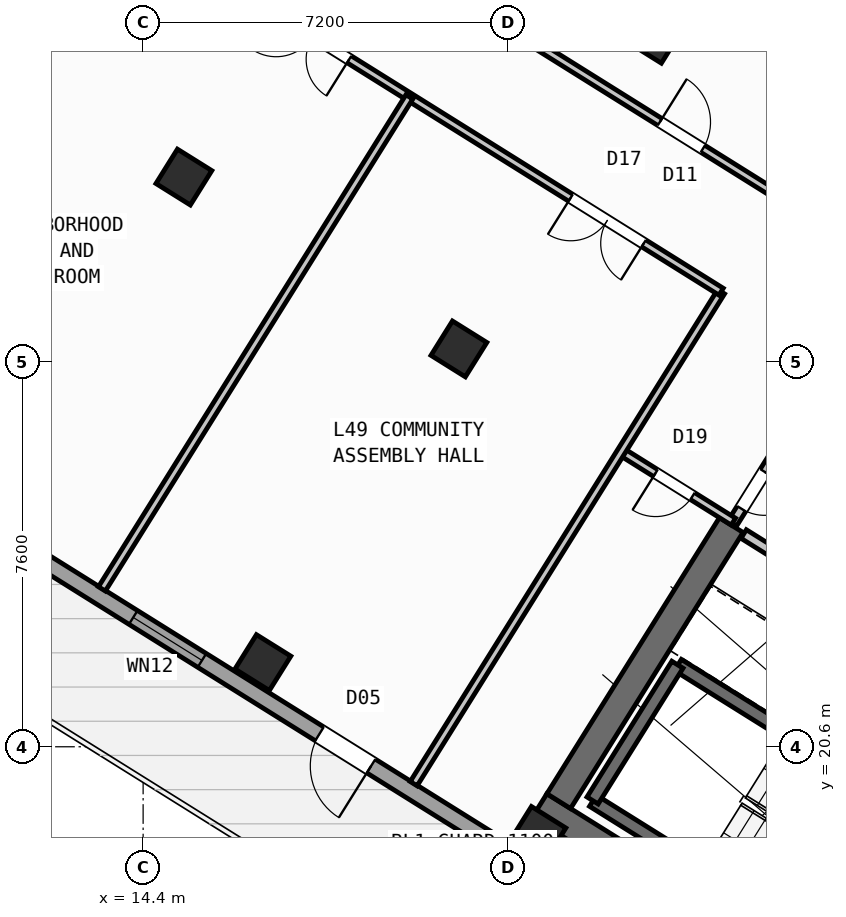
"""IFC4 building model, lengths in metres.
Left out: names, types, materials, properties, quantities, classifications, styles, units other than length and angle.
Written with IfcOpenShell. Run it as: python <this file> out.ifc"""

import sys

from ifc_helpers import new_model, si_unit, direction, frame, frame_2d, origin, origin_2d, place, context, subcontext, project, spatial, rectangle, hollow_rectangle, extrude, source, transform, mapped, element, fill, save


model = new_model("IFC4")
c1 = context("Model", 3, precision=1e-05, world=origin(), true_north=direction((0.0, 1.0)))
c2 = subcontext(c1, "Body", "Model", "MODEL_VIEW")
j1 = project(units=[si_unit("LENGTHUNIT", "METRE"), si_unit("PLANEANGLEUNIT", "RADIAN")], contexts=[c1])
p1 = place(None, origin())
s1 = spatial("IfcSite", under=j1, at=p1, CompositionType="ELEMENT")
p2 = place(p1, origin())
s2 = spatial("IfcBuilding", under=s1, at=p2, CompositionType="ELEMENT")
p3 = place(p2, frame((0.0, 0.0, 195.0)))
s3 = spatial("IfcBuildingStorey", under=s2, at=p3, CompositionType="ELEMENT", Elevation=195.0)
p4 = place(p3, frame((33.366, 12.477, 0.0), z_axis=(0.0, 0.0, 1.0), x_axis=(-0.848047359947, 0.529920442413, 0.0)))
e1 = element("IfcWall", 1, at=p4, inside=s3, PredefinedType="SHEAR", context=c2, shape_type="SweptSolid", body=[
    extrude(rectangle(XDim=13.14, YDim=0.55, at=frame_2d((6.57, 0.0))), origin(), (0.0, 0.0, 1.0), 4.22),
])
p5 = place(p3, frame((26.007, 24.976, 0.0), z_axis=(0.0, 0.0, 1.0), x_axis=(-0.529923795287, -0.848045264823, 0.0)))
e2 = element("IfcWall", 2, at=p5, inside=s3, PredefinedType="SHEAR", context=c2, shape_type="SweptSolid", body=[
    extrude(rectangle(XDim=6.425, YDim=0.55, at=frame_2d((3.212, 0.0))), origin(), (0.0, 0.0, 1.0), 4.22),
])
m1 = source(origin(), c2, "Body", "SweptSolid", [
    extrude(hollow_rectangle(XDim=0.8, YDim=0.8, WallThickness=0.032, at=origin_2d()), origin(), (0.0, 0.0, 1.0), 4.5),
])
for number, where, z_axis, x_axis in (
    (3, (22.191, 18.87, 0.0), (0.0, 0.0, 1.0), (-0.848, 0.53, 0.0)),
    (4, (24.5, 34.643, 0.0), (0.0, 0.0, 1.0), (-0.848, 0.53, 0.0)),
    (5, (20.632, 28.452, 0.0), (0.0, 0.0, 1.0), (-0.848, 0.53, 0.0)),
    (6, (16.764, 22.261, 0.0), (0.0, 0.0, 1.0), (-0.848, 0.53, 0.0)),
    (7, (15.205, 31.844, 0.0), (0.0, 0.0, 1.0), (-0.848, 0.53, 0.0)),
):
    element("IfcColumn", number, at=place(p3, frame(where, z_axis=z_axis, x_axis=x_axis)), inside=s3, PredefinedType="COLUMN", context=c2, shape_type="MappedRepresentation", body=[
        mapped(m1, transform((0.0, 0.0, 0.0), scale=1.0)),
    ])
p6 = place(p3, frame((31.76, 12.183, 0.0), z_axis=(0.0, 0.0, 1.0), x_axis=(-0.848047074256, 0.529920899612, 0.0)))
e8 = element("IfcWall", 8, at=p6, inside=s3, PredefinedType="STANDARD", context=c2, shape_type="SweptSolid", body=[
    extrude(rectangle(XDim=30.652, YDim=0.32, at=frame_2d((15.326, 0.0))), origin(), (0.0, 0.0, 1.0), 4.22),
])
p7 = place(p6, frame((15.166, 0.0, 0.0)))
e9 = element("IfcOpeningElement", 9, at=p7, cuts=e8, PredefinedType="OPENING", context=c2, shape_type="SweptSolid", body=[
    extrude(rectangle(XDim=1.2, YDim=2.15, at=frame_2d((0.6, 1.075))), frame((0.0, 0.17, 0.0), z_axis=(0.0, -1.0, 0.0), x_axis=(1.0, 0.0, 0.0)), (0.0, 0.0, 1.0), 0.34),
])
p8 = place(p6, frame((1.765, 0.0, 0.7)))
e10 = element("IfcOpeningElement", 10, at=p8, cuts=e8, PredefinedType="OPENING", context=c2, shape_type="SweptSolid", body=[
    extrude(rectangle(XDim=2.6, YDim=2.0, at=frame_2d((1.3, 1.0))), frame((0.0, 0.17, 0.0), z_axis=(0.0, -1.0, 0.0), x_axis=(1.0, 0.0, 0.0)), (0.0, 0.0, 1.0), 0.34),
])
p9 = place(p6, frame((6.994, 0.0, 0.7)))
e11 = element("IfcOpeningElement", 11, at=p9, cuts=e8, PredefinedType="OPENING", context=c2, shape_type="SweptSolid", body=[
    extrude(rectangle(XDim=2.6, YDim=2.0, at=frame_2d((1.3, 1.0))), frame((0.0, 0.17, 0.0), z_axis=(0.0, -1.0, 0.0), x_axis=(1.0, 0.0, 0.0)), (0.0, 0.0, 1.0), 0.34),
])
p10 = place(p6, frame((19.101, 0.0, 0.85)))
e12 = element("IfcOpeningElement", 12, at=p10, cuts=e8, PredefinedType="OPENING", context=c2, shape_type="SweptSolid", body=[
    extrude(rectangle(XDim=1.6, YDim=1.8, at=frame_2d((0.8, 0.9))), frame((0.0, 0.17, 0.0), z_axis=(0.0, -1.0, 0.0), x_axis=(1.0, 0.0, 0.0)), (0.0, 0.0, 1.0), 0.34),
])
p11 = place(p6, frame((26.358, 0.0, 0.7)))
e13 = element("IfcOpeningElement", 13, at=p11, cuts=e8, PredefinedType="OPENING", context=c2, shape_type="SweptSolid", body=[
    extrude(rectangle(XDim=2.6, YDim=2.0, at=frame_2d((1.3, 1.0))), frame((0.0, 0.17, 0.0), z_axis=(0.0, -1.0, 0.0), x_axis=(1.0, 0.0, 0.0)), (0.0, 0.0, 1.0), 0.34),
])
p12 = place(p3, frame((5.7, 28.71, 0.0), z_axis=(0.0, 0.0, 1.0), x_axis=(0.529923711467, 0.8480453172, 0.0)))
e14 = element("IfcWall", 14, at=p12, inside=s3, PredefinedType="STANDARD", context=c2, shape_type="SweptSolid", body=[
    extrude(rectangle(XDim=21.587, YDim=0.32, at=frame_2d((10.794, 0.0))), origin(), (0.0, 0.0, 1.0), 3.695),
])
p13 = place(p12, frame((2.744, 0.0, 0.7)))
e15 = element("IfcOpeningElement", 15, at=p13, cuts=e14, PredefinedType="OPENING", context=c2, shape_type="SweptSolid", body=[
    extrude(rectangle(XDim=2.6, YDim=2.0, at=frame_2d((1.3, 1.0))), frame((0.0, 0.17, 0.0), z_axis=(0.0, -1.0, 0.0), x_axis=(1.0, 0.0, 0.0)), (0.0, 0.0, 1.0), 0.34),
])
p14 = place(p12, frame((8.654, 0.0, 0.75)))
e16 = element("IfcOpeningElement", 16, at=p14, cuts=e14, PredefinedType="OPENING", context=c2, shape_type="SweptSolid", body=[
    extrude(rectangle(XDim=2.0, YDim=1.95, at=frame_2d((1.0, 0.975))), frame((0.0, 0.17, 0.0), z_axis=(0.0, -1.0, 0.0), x_axis=(1.0, 0.0, 0.0)), (0.0, 0.0, 1.0), 0.34),
])
p15 = place(p12, frame((17.356, 0.0, 0.85)))
e17 = element("IfcOpeningElement", 17, at=p15, cuts=e14, PredefinedType="OPENING", context=c2, shape_type="SweptSolid", body=[
    extrude(rectangle(XDim=1.6, YDim=1.8, at=frame_2d((0.8, 0.9))), frame((0.0, 0.17, 0.0), z_axis=(0.0, -1.0, 0.0), x_axis=(1.0, 0.0, 0.0)), (0.0, 0.0, 1.0), 0.34),
])
p16 = place(p3, frame((17.424, 47.083, 0.0), z_axis=(0.0, 0.0, 1.0), x_axis=(0.848049927979, -0.529916332693, 0.0)))
e18 = element("IfcWall", 18, at=p16, inside=s3, PredefinedType="STANDARD", context=c2, shape_type="SweptSolid", body=[
    extrude(rectangle(XDim=29.223, YDim=0.32, at=frame_2d((14.612, 0.0))), origin(), (0.0, 0.0, 1.0), 4.22),
])
p17 = place(p16, frame((2.752, 0.0, 0.0)))
e19 = element("IfcOpeningElement", 19, at=p17, cuts=e18, PredefinedType="OPENING", context=c2, shape_type="SweptSolid", body=[
    extrude(rectangle(XDim=1.05, YDim=2.15, at=frame_2d((0.525, 1.075))), frame((0.0, 0.17, 0.0), z_axis=(0.0, -1.0, 0.0), x_axis=(1.0, 0.0, 0.0)), (0.0, 0.0, 1.0), 0.34),
])
p18 = place(p16, frame((0.641, 0.0, 0.85)))
e20 = element("IfcOpeningElement", 20, at=p18, cuts=e18, PredefinedType="OPENING", context=c2, shape_type="SweptSolid", body=[
    extrude(rectangle(XDim=1.6, YDim=1.8, at=frame_2d((0.8, 0.9))), frame((0.0, 0.17, 0.0), z_axis=(0.0, -1.0, 0.0), x_axis=(1.0, 0.0, 0.0)), (0.0, 0.0, 1.0), 0.34),
])
p19 = place(p16, frame((9.876, 0.0, 0.75)))
e21 = element("IfcOpeningElement", 21, at=p19, cuts=e18, PredefinedType="OPENING", context=c2, shape_type="SweptSolid", body=[
    extrude(rectangle(XDim=2.0, YDim=1.95, at=frame_2d((1.0, 0.975))), frame((0.0, 0.17, 0.0), z_axis=(0.0, -1.0, 0.0), x_axis=(1.0, 0.0, 0.0)), (0.0, 0.0, 1.0), 0.34),
])
p20 = place(p16, frame((13.674, 0.0, 0.85)))
e22 = element("IfcOpeningElement", 22, at=p20, cuts=e18, PredefinedType="OPENING", context=c2, shape_type="SweptSolid", body=[
    extrude(rectangle(XDim=1.6, YDim=1.8, at=frame_2d((0.8, 0.9))), frame((0.0, 0.17, 0.0), z_axis=(0.0, -1.0, 0.0), x_axis=(1.0, 0.0, 0.0)), (0.0, 0.0, 1.0), 0.34),
])
p21 = place(p3, frame((29.605, 15.581, 0.0), z_axis=(0.0, 0.0, 1.0), x_axis=(-0.848036911448, 0.529937163087, 0.0)))
e23 = element("IfcWall", 23, at=p21, inside=s3, PredefinedType="SHEAR", context=c2, shape_type="SweptSolid", body=[
    extrude(rectangle(XDim=7.46, YDim=0.26, at=frame_2d((3.73, 0.0))), origin(), (0.0, 0.0, 1.0), 4.22),
])
p22 = place(p3, frame((31.28, 18.261, 0.0), z_axis=(0.0, 0.0, 1.0), x_axis=(-0.848051618787, 0.529913626805, 0.0)))
e24 = element("IfcWall", 24, at=p22, inside=s3, PredefinedType="SHEAR", context=c2, shape_type="SweptSolid", body=[
    extrude(rectangle(XDim=7.46, YDim=0.26, at=frame_2d((3.73, 0.0))), origin(), (0.0, 0.0, 1.0), 4.22),
])
p23 = place(p22, frame((0.36, 0.0, 0.0)))
e25 = element("IfcOpeningElement", 25, at=p23, cuts=e24, PredefinedType="OPENING", context=c2, shape_type="SweptSolid", body=[
    extrude(rectangle(XDim=0.86, YDim=2.05, at=frame_2d((0.43, 1.025))), frame((0.0, 0.14, 0.0), z_axis=(0.0, -1.0, 0.0), x_axis=(1.0, 0.0, 0.0)), (0.0, 0.0, 1.0), 0.28),
])
p24 = place(p3, frame((24.945, 22.22, 0.0), z_axis=(0.0, 0.0, 1.0), x_axis=(-0.529908658664, -0.84805472316, 0.0)))
e26 = element("IfcWall", 26, at=p24, inside=s3, PredefinedType="SHEAR", context=c2, shape_type="SweptSolid", body=[
    extrude(rectangle(XDim=3.16, YDim=0.26, at=frame_2d((1.58, 0.0))), origin(), (0.0, 0.0, 1.0), 4.22),
])
p25 = place(p3, frame((31.525, 21.504, 0.0), z_axis=(0.0, 0.0, 1.0), x_axis=(-0.848040211232, 0.529931882541, 0.0)))
e27 = element("IfcWall", 27, at=p25, inside=s3, PredefinedType="STANDARD", context=c2, shape_type="SweptSolid", body=[
    extrude(rectangle(XDim=6.218, YDim=0.2, at=frame_2d((3.109, 0.0))), origin(), (0.0, 0.0, 1.0), 4.21),
])
p26 = place(p25, frame((4.4, 0.0, 0.0)))
e28 = element("IfcOpeningElement", 28, at=p26, cuts=e27, PredefinedType="OPENING", context=c2, shape_type="SweptSolid", body=[
    extrude(rectangle(XDim=0.86, YDim=2.05, at=frame_2d((0.43, 1.025))), frame((0.0, 0.11, 0.0), z_axis=(0.0, -1.0, 0.0), x_axis=(1.0, 0.0, 0.0)), (0.0, 0.0, 1.0), 0.22),
])
p27 = place(p25, frame((1.45, 0.0, 0.0)))
e29 = element("IfcOpeningElement", 29, at=p27, cuts=e27, PredefinedType="OPENING", context=c2, shape_type="SweptSolid", body=[
    extrude(rectangle(XDim=0.86, YDim=2.05, at=frame_2d((0.43, 1.025))), frame((0.0, 0.11, 0.0), z_axis=(0.0, -1.0, 0.0), x_axis=(1.0, 0.0, 0.0)), (0.0, 0.0, 1.0), 0.22),
])
p28 = place(p3, frame((27.596, 27.52, 0.0), z_axis=(0.0, 0.0, 1.0), x_axis=(-0.529865479138, -0.848081702443, 0.0)))
e30 = element("IfcWall", 30, at=p28, inside=s3, PredefinedType="STANDARD", context=c2, shape_type="SweptSolid", body=[
    extrude(rectangle(XDim=2.96, YDim=0.2, at=frame_2d((1.48, 0.0))), origin(), (0.0, 0.0, 1.0), 4.21),
])
p29 = place(p28, frame((1.76, 0.0, 0.0)))
e31 = element("IfcOpeningElement", 31, at=p29, cuts=e30, PredefinedType="OPENING", context=c2, shape_type="SweptSolid", body=[
    extrude(rectangle(XDim=0.86, YDim=2.05, at=frame_2d((0.43, 1.025))), frame((0.0, 0.11, 0.0), z_axis=(0.0, -1.0, 0.0), x_axis=(1.0, 0.0, 0.0)), (0.0, 0.0, 1.0), 0.22),
])
p30 = place(p3, frame((26.049, 25.044, 0.0), z_axis=(0.0, 0.0, 1.0), x_axis=(-0.848050851465, 0.529914854792, 0.0)))
e32 = element("IfcWall", 32, at=p30, inside=s3, PredefinedType="PARTITIONING", context=c2, shape_type="SweptSolid", body=[
    extrude(rectangle(XDim=2.61, YDim=0.16, at=frame_2d((1.305, 0.0))), origin(), (0.0, 0.0, 1.0), 3.695),
])
p31 = place(p30, frame((0.95, 0.0, 0.0)))
e33 = element("IfcOpeningElement", 33, at=p31, cuts=e32, PredefinedType="OPENING", context=c2, shape_type="SweptSolid", body=[
    extrude(rectangle(XDim=0.86, YDim=2.05, at=frame_2d((0.43, 1.025))), frame((0.0, 0.09, 0.0), z_axis=(0.0, -1.0, 0.0), x_axis=(1.0, 0.0, 0.0)), (0.0, 0.0, 1.0), 0.18),
])
p32 = place(p3, frame((25.807, 29.582, 0.0), z_axis=(0.0, 0.0, 1.0), x_axis=(-0.529920357077, -0.848047413271, 0.0)))
e34 = element("IfcWall", 34, at=p32, inside=s3, PredefinedType="PARTITIONING", context=c2, shape_type="SweptSolid", body=[
    extrude(rectangle(XDim=11.45, YDim=0.16, at=frame_2d((5.725, 0.0))), origin(), (0.0, 0.0, 1.0), 4.21),
])
p33 = place(p3, frame((26.973, 31.447, 0.0), z_axis=(0.0, 0.0, 1.0), x_axis=(-0.848048310262, 0.529918921593, 0.0)))
e35 = element("IfcWall", 35, at=p33, inside=s3, PredefinedType="PARTITIONING", context=c2, shape_type="SweptSolid", body=[
    extrude(rectangle(XDim=16.73, YDim=0.16, at=frame_2d((8.365, 0.0))), origin(), (0.0, 0.0, 1.0), 4.21),
])
p34 = place(p33, frame((1.8, 0.0, 0.0)))
e36 = element("IfcOpeningElement", 36, at=p34, cuts=e35, PredefinedType="OPENING", context=c2, shape_type="SweptSolid", body=[
    extrude(rectangle(XDim=1.0, YDim=2.1, at=frame_2d((0.5, 1.05))), frame((0.0, 0.09, 0.0), z_axis=(0.0, -1.0, 0.0), x_axis=(1.0, 0.0, 0.0)), (0.0, 0.0, 1.0), 0.18),
])
p35 = place(p33, frame((8.155, 0.0, 0.0)))
e37 = element("IfcOpeningElement", 37, at=p35, cuts=e35, PredefinedType="OPENING", context=c2, shape_type="SweptSolid", body=[
    extrude(rectangle(XDim=1.0, YDim=2.1, at=frame_2d((0.5, 1.05))), frame((0.0, 0.09, 0.0), z_axis=(0.0, -1.0, 0.0), x_axis=(1.0, 0.0, 0.0)), (0.0, 0.0, 1.0), 0.18),
])
p36 = place(p33, frame((12.882, 0.0, 0.0)))
e38 = element("IfcOpeningElement", 38, at=p36, cuts=e35, PredefinedType="OPENING", context=c2, shape_type="SweptSolid", body=[
    extrude(rectangle(XDim=1.0, YDim=2.1, at=frame_2d((0.5, 1.05))), frame((0.0, 0.09, 0.0), z_axis=(0.0, -1.0, 0.0), x_axis=(1.0, 0.0, 0.0)), (0.0, 0.0, 1.0), 0.18),
])
p37 = place(p3, frame((25.807, 29.582, 0.0), z_axis=(0.0, 0.0, 1.0), x_axis=(-0.848052408131, 0.529912363569, 0.0)))
e39 = element("IfcWall", 39, at=p37, inside=s3, PredefinedType="PARTITIONING", context=c2, shape_type="SweptSolid", body=[
    extrude(rectangle(XDim=16.73, YDim=0.16, at=frame_2d((8.365, 0.0))), origin(), (0.0, 0.0, 1.0), 4.21),
])
p38 = place(p37, frame((1.8, 0.0, 0.0)))
e40 = element("IfcOpeningElement", 40, at=p38, cuts=e39, PredefinedType="OPENING", context=c2, shape_type="SweptSolid", body=[
    extrude(rectangle(XDim=1.7, YDim=2.2, at=frame_2d((0.85, 1.1))), frame((0.0, 0.09, 0.0), z_axis=(0.0, -1.0, 0.0), x_axis=(1.0, 0.0, 0.0)), (0.0, 0.0, 1.0), 0.18),
])
p39 = place(p37, frame((8.655, 0.0, 0.0)))
e41 = element("IfcOpeningElement", 41, at=p39, cuts=e39, PredefinedType="OPENING", context=c2, shape_type="SweptSolid", body=[
    extrude(rectangle(XDim=1.7, YDim=2.2, at=frame_2d((0.85, 1.1))), frame((0.0, 0.09, 0.0), z_axis=(0.0, -1.0, 0.0), x_axis=(1.0, 0.0, 0.0)), (0.0, 0.0, 1.0), 0.18),
])
p40 = place(p3, frame((19.654, 33.426, 0.0), z_axis=(0.0, 0.0, 1.0), x_axis=(-0.529920357077, -0.848047413271, 0.0)))
e42 = element("IfcWall", 42, at=p40, inside=s3, PredefinedType="PARTITIONING", context=c2, shape_type="SweptSolid", body=[
    extrude(rectangle(XDim=11.45, YDim=0.16, at=frame_2d((5.725, 0.0))), origin(), (0.0, 0.0, 1.0), 4.21),
])
m2 = source(origin(), c2, "Body", "SweptSolid", [
    extrude(rectangle(XDim=1.2, YDim=2.15, at=frame_2d((0.6, 1.075))), frame((0.0, 0.025, 0.0), z_axis=(0.0, -1.0, 0.0), x_axis=(1.0, 0.0, 0.0)), (0.0, 0.0, 1.0), 0.05),
])
p41 = place(p7, origin())
e43 = element("IfcDoor", 43, at=p41, inside=s3, OperationType="SINGLE_SWING_LEFT", PredefinedType="DOOR", context=c2, shape_type="MappedRepresentation", body=[
    mapped(m2, transform((0.0, 0.0, 0.0), scale=1.0)),
])
fill(e9, e43)
m3 = source(origin(), c2, "Body", "SweptSolid", [
    extrude(rectangle(XDim=1.6, YDim=1.8, at=frame_2d((0.8, 0.9))), frame((0.0, 0.03, 0.0), z_axis=(0.0, -1.0, 0.0), x_axis=(1.0, 0.0, 0.0)), (0.0, 0.0, 1.0), 0.06),
])
p42 = place(p10, origin())
e44 = element("IfcWindow", 44, at=p42, inside=s3, PartitioningType="SINGLE_PANEL", PredefinedType="WINDOW", context=c2, shape_type="MappedRepresentation", body=[
    mapped(m3, transform((0.0, 0.0, 0.0), scale=1.0)),
])
fill(e12, e44)
m4 = source(origin(), c2, "Body", "SweptSolid", [
    extrude(rectangle(XDim=0.86, YDim=2.05, at=frame_2d((0.43, 1.025))), frame((0.0, 0.025, 0.0), z_axis=(0.0, -1.0, 0.0), x_axis=(1.0, 0.0, 0.0)), (0.0, 0.0, 1.0), 0.05),
])
p43 = place(p31, origin())
e45 = element("IfcDoor", 45, at=p43, inside=s3, OperationType="SINGLE_SWING_RIGHT", PredefinedType="DOOR", context=c2, shape_type="MappedRepresentation", body=[
    mapped(m4, transform((0.0, 0.0, 0.0), scale=1.0)),
])
fill(e33, e45)
p44 = place(p29, origin())
e46 = element("IfcDoor", 46, at=p44, inside=s3, OperationType="SINGLE_SWING_LEFT", PredefinedType="DOOR", context=c2, shape_type="MappedRepresentation", body=[
    mapped(m4, transform((0.0, 0.0, 0.0), scale=1.0)),
])
fill(e31, e46)
m5 = source(origin(), c2, "Body", "SweptSolid", [
    extrude(rectangle(XDim=1.7, YDim=2.2, at=frame_2d((0.85, 1.1))), frame((0.0, 0.025, 0.0), z_axis=(0.0, -1.0, 0.0), x_axis=(1.0, 0.0, 0.0)), (0.0, 0.0, 1.0), 0.05),
])
p45 = place(p38, origin())
e47 = element("IfcDoor", 47, at=p45, inside=s3, OperationType="DOUBLE_DOOR_SINGLE_SWING", PredefinedType="DOOR", context=c2, shape_type="MappedRepresentation", body=[
    mapped(m5, transform((0.0, 0.0, 0.0), scale=1.0)),
])
fill(e40, e47)
p46 = place(p39, origin())
e48 = element("IfcDoor", 48, at=p46, inside=s3, OperationType="DOUBLE_DOOR_SINGLE_SWING", PredefinedType="DOOR", context=c2, shape_type="MappedRepresentation", body=[
    mapped(m5, transform((0.0, 0.0, 0.0), scale=1.0)),
])
fill(e41, e48)
m6 = source(origin(), c2, "Body", "SweptSolid", [
    extrude(rectangle(XDim=1.0, YDim=2.1, at=frame_2d((0.5, 1.05))), frame((0.0, 0.025, 0.0), z_axis=(0.0, -1.0, 0.0), x_axis=(1.0, 0.0, 0.0)), (0.0, 0.0, 1.0), 0.05),
])
p47 = place(p34, frame((1.0, 0.0, 0.0), z_axis=(0.0, 0.0, 1.0), x_axis=(-1.0, 0.0, 0.0)))
e49 = element("IfcDoor", 49, at=p47, inside=s3, OperationType="SINGLE_SWING_LEFT", PredefinedType="DOOR", context=c2, shape_type="MappedRepresentation", body=[
    mapped(m6, transform((0.0, 0.0, 0.0), scale=1.0)),
])
fill(e36, e49)
save(model, sys.argv[1])
